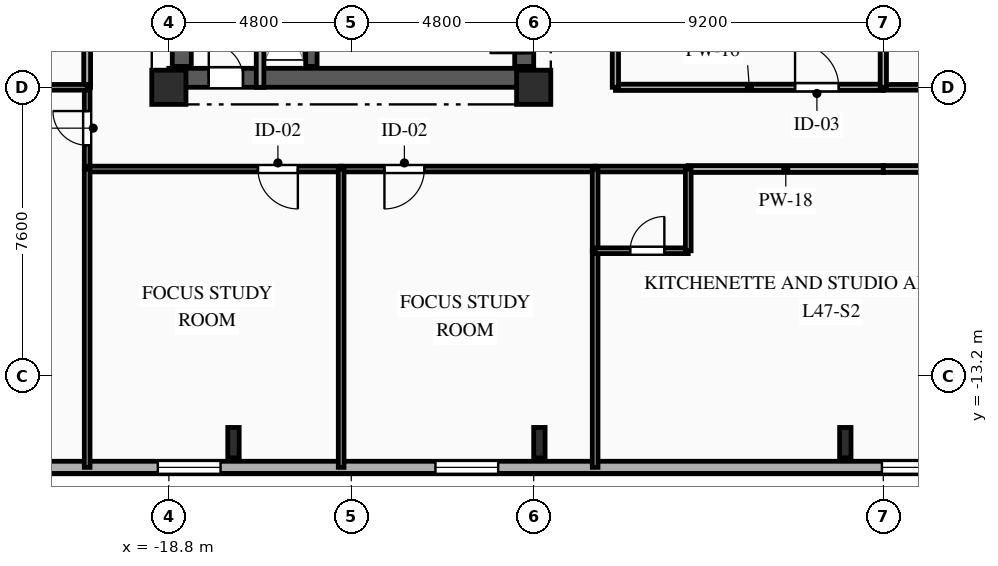
"""IFC4 building model, lengths in metres.
Left out: names, types, materials, properties, quantities, classifications, styles, units other than length and angle.
Written with IfcOpenShell. Run it as: python <this file> out.ifc"""

import sys

from ifc_helpers import new_model, si_unit, direction, frame, frame_2d, origin, origin_2d, place, context, subcontext, project, spatial, rectangle, i_section, extrude, element, fill, save


model = new_model("IFC4")
c1 = context("Model", 3, precision=1e-05, world=origin(), true_north=direction((0.0, 1.0)))
c2 = subcontext(c1, "Body", "Model", "MODEL_VIEW")
j1 = project(units=[si_unit("LENGTHUNIT", "METRE"), si_unit("PLANEANGLEUNIT", "RADIAN")], contexts=[c1])
p1 = place(None, origin())
s1 = spatial("IfcSite", under=j1, at=p1, CompositionType="ELEMENT")
p2 = place(p1, origin())
s2 = spatial("IfcBuilding", under=s1, at=p2, CompositionType="ELEMENT")
p3 = place(p2, frame((0.0, 0.0, 167.85)))
s3 = spatial("IfcBuildingStorey", under=s2, at=p3, CompositionType="ELEMENT", Elevation=167.85)
for number, where, z_axis, x_axis in (
    (1, (-18.8, -5.6, 0.0), (0.0, 0.0, 1.0), (1.0, 0.0, 0.0)),
    (2, (-9.2, -5.6, 0.0), (0.0, 0.0, 1.0), (1.0, 0.0, 0.0)),
):
    element("IfcColumn", number, at=place(p3, frame(where, z_axis=z_axis, x_axis=x_axis)), inside=s3, PredefinedType="COLUMN", context=c2, shape_type="SweptSolid", body=[
        extrude(rectangle(XDim=0.9, YDim=0.9, at=origin_2d()), origin(), (0.0, 0.0, 1.0), 3.35),
    ])
for number, where, z_axis, x_axis in (
    (3, (-17.1, -14.95, 0.0), (0.0, 0.0, 1.0), (1.0, 0.0, 0.0)),
    (4, (-9.05, -14.95, 0.0), (0.0, 0.0, 1.0), (1.0, 0.0, 0.0)),
    (5, (-1.0, -14.95, 0.0), (0.0, 0.0, 1.0), (1.0, 0.0, 0.0)),
):
    element("IfcColumn", number, at=place(p3, frame(where, z_axis=z_axis, x_axis=x_axis)), inside=s3, PredefinedType="COLUMN", context=c2, shape_type="SweptSolid", body=[
        extrude(i_section(OverallWidth=0.3, OverallDepth=0.8, WebThickness=0.018, FlangeThickness=0.033, FilletRadius=0.03, at=origin_2d()), origin(), (0.0, 0.0, 1.0), 3.35),
    ])
p4 = place(p3, frame((23.8, -15.6, 0.0), z_axis=(0.0, 0.0, 1.0), x_axis=(-1.0, 0.0, 0.0)))
e6 = element("IfcWall", 6, at=p4, inside=s3, PredefinedType="SOLIDWALL", context=c2, shape_type="SweptSolid", body=[
    extrude(rectangle(XDim=49.6, YDim=0.32, at=frame_2d((24.8, 0.0))), origin(), (0.0, 0.0, 1.0), 3.04),
])
p5 = place(p4, frame((1.13, 0.0, 0.85)))
e7 = element("IfcOpeningElement", 7, at=p5, cuts=e6, PredefinedType="OPENING", context=c2, shape_type="SweptSolid", body=[
    extrude(rectangle(XDim=1.1, YDim=1.85, at=frame_2d((0.55, 0.925))), frame((0.0, 0.17, 0.0), z_axis=(0.0, -1.0, 0.0), x_axis=(1.0, 0.0, 0.0)), (0.0, 0.0, 1.0), 0.34),
])
p6 = place(p4, frame((5.695, 0.0, 0.85)))
e8 = element("IfcOpeningElement", 8, at=p6, cuts=e6, PredefinedType="OPENING", context=c2, shape_type="SweptSolid", body=[
    extrude(rectangle(XDim=1.65, YDim=1.85, at=frame_2d((0.825, 0.925))), frame((0.0, 0.17, 0.0), z_axis=(0.0, -1.0, 0.0), x_axis=(1.0, 0.0, 0.0)), (0.0, 0.0, 1.0), 0.34),
])
p7 = place(p4, frame((12.975, 0.0, 0.85)))
e9 = element("IfcOpeningElement", 9, at=p7, cuts=e6, PredefinedType="OPENING", context=c2, shape_type="SweptSolid", body=[
    extrude(rectangle(XDim=1.65, YDim=1.85, at=frame_2d((0.825, 0.925))), frame((0.0, 0.17, 0.0), z_axis=(0.0, -1.0, 0.0), x_axis=(1.0, 0.0, 0.0)), (0.0, 0.0, 1.0), 0.34),
])
p8 = place(p4, frame((21.636, 0.0, 0.85)))
e10 = element("IfcOpeningElement", 10, at=p8, cuts=e6, PredefinedType="OPENING", context=c2, shape_type="SweptSolid", body=[
    extrude(rectangle(XDim=2.2, YDim=1.85, at=frame_2d((1.1, 0.925))), frame((0.0, 0.17, 0.0), z_axis=(0.0, -1.0, 0.0), x_axis=(1.0, 0.0, 0.0)), (0.0, 0.0, 1.0), 0.34),
])
p9 = place(p4, frame((33.935, 0.0, 0.85)))
e11 = element("IfcOpeningElement", 11, at=p9, cuts=e6, PredefinedType="OPENING", context=c2, shape_type="SweptSolid", body=[
    extrude(rectangle(XDim=1.65, YDim=1.85, at=frame_2d((0.825, 0.925))), frame((0.0, 0.17, 0.0), z_axis=(0.0, -1.0, 0.0), x_axis=(1.0, 0.0, 0.0)), (0.0, 0.0, 1.0), 0.34),
])
p10 = place(p4, frame((41.24, 0.0, 0.85)))
e12 = element("IfcOpeningElement", 12, at=p10, cuts=e6, PredefinedType="OPENING", context=c2, shape_type="SweptSolid", body=[
    extrude(rectangle(XDim=1.65, YDim=1.85, at=frame_2d((0.825, 0.925))), frame((0.0, 0.17, 0.0), z_axis=(0.0, -1.0, 0.0), x_axis=(1.0, 0.0, 0.0)), (0.0, 0.0, 1.0), 0.34),
])
p11 = place(p4, frame((46.175, 0.0, 0.85)))
e13 = element("IfcOpeningElement", 13, at=p11, cuts=e6, PredefinedType="OPENING", context=c2, shape_type="SweptSolid", body=[
    extrude(rectangle(XDim=1.65, YDim=1.85, at=frame_2d((0.825, 0.925))), frame((0.0, 0.17, 0.0), z_axis=(0.0, -1.0, 0.0), x_axis=(1.0, 0.0, 0.0)), (0.0, 0.0, 1.0), 0.34),
])
p12 = place(p3, frame((-18.8, -5.35, 0.0), z_axis=(0.0, 0.0, 1.0), x_axis=(1.0, 0.0, 0.0)))
e14 = element("IfcWall", 14, at=p12, inside=s3, PredefinedType="SHEAR", context=c2, shape_type="SweptSolid", body=[
    extrude(rectangle(XDim=9.6, YDim=0.5, at=frame_2d((4.8, 0.0))), origin(), (0.0, 0.0, 1.0), 3.04),
])
p13 = place(p12, frame((1.05, 0.0, 0.0)))
e15 = element("IfcOpeningElement", 15, at=p13, cuts=e14, PredefinedType="OPENING", context=c2, shape_type="SweptSolid", body=[
    extrude(rectangle(XDim=0.9, YDim=2.1, at=frame_2d((0.45, 1.05))), frame((0.0, 0.26, 0.0), z_axis=(0.0, -1.0, 0.0), x_axis=(1.0, 0.0, 0.0)), (0.0, 0.0, 1.0), 0.52),
])
p14 = place(p3, frame((-18.46, -5.05, 0.0), z_axis=(0.0, 0.0, 1.0), x_axis=(0.0, 1.0, 0.0)))
e16 = element("IfcWall", 16, at=p14, inside=s3, PredefinedType="SHEAR", context=c2, shape_type="SweptSolid", body=[
    extrude(rectangle(XDim=10.1, YDim=0.5, at=frame_2d((5.05, 0.0))), origin(), (0.0, 0.0, 1.0), 3.04),
])
p15 = place(p3, frame((-9.45, -5.05, 0.0), z_axis=(0.0, 0.0, 1.0), x_axis=(0.0, 1.0, 0.0)))
e17 = element("IfcWall", 17, at=p15, inside=s3, PredefinedType="SHEAR", context=c2, shape_type="SweptSolid", body=[
    extrude(rectangle(XDim=10.1, YDim=0.5, at=frame_2d((5.05, 0.0))), origin(), (0.0, 0.0, 1.0), 3.04),
])
p16 = place(p15, frame((7.175, 0.0, 0.0)))
e18 = element("IfcOpeningElement", 18, at=p16, cuts=e17, PredefinedType="OPENING", context=c2, shape_type="SweptSolid", body=[
    extrude(rectangle(XDim=0.9, YDim=2.1, at=frame_2d((0.45, 1.05))), frame((0.0, 0.26, 0.0), z_axis=(0.0, -1.0, 0.0), x_axis=(1.0, 0.0, 0.0)), (0.0, 0.0, 1.0), 0.52),
])
p17 = place(p15, frame((2.4, 0.0, 0.0)))
e19 = element("IfcOpeningElement", 19, at=p17, cuts=e17, PredefinedType="OPENING", context=c2, shape_type="SweptSolid", body=[
    extrude(rectangle(XDim=1.2, YDim=2.15, at=frame_2d((0.6, 1.075))), frame((0.0, 0.26, 0.0), z_axis=(0.0, -1.0, 0.0), x_axis=(1.0, 0.0, 0.0)), (0.0, 0.0, 1.0), 0.52),
])
p18 = place(p15, frame((0.35, 0.0, 0.0)))
e20 = element("IfcOpeningElement", 20, at=p18, cuts=e17, PredefinedType="OPENING", context=c2, shape_type="SweptSolid", body=[
    extrude(rectangle(XDim=0.9, YDim=2.1, at=frame_2d((0.45, 1.05))), frame((0.0, 0.26, 0.0), z_axis=(0.0, -1.0, 0.0), x_axis=(1.0, 0.0, 0.0)), (0.0, 0.0, 1.0), 0.52),
])
p19 = place(p15, frame((5.0, 0.0, 0.0)))
e21 = element("IfcOpeningElement", 21, at=p19, cuts=e17, PredefinedType="OPENING", context=c2, shape_type="SweptSolid", body=[
    extrude(rectangle(XDim=0.9, YDim=2.1, at=frame_2d((0.45, 1.05))), frame((0.0, 0.26, 0.0), z_axis=(0.0, -1.0, 0.0), x_axis=(1.0, 0.0, 0.0)), (0.0, 0.0, 1.0), 0.52),
])
p20 = place(p3, frame((-15.05, -5.05, 0.0), z_axis=(0.0, 0.0, 1.0), x_axis=(0.0, 1.0, 0.0)))
e22 = element("IfcWall", 22, at=p20, inside=s3, PredefinedType="SHEAR", context=c2, shape_type="SweptSolid", body=[
    extrude(rectangle(XDim=10.1, YDim=0.3, at=frame_2d((5.05, 0.0))), origin(), (0.0, 0.0, 1.0), 3.04),
])
p21 = place(p3, frame((-16.4, -5.6, 0.0), z_axis=(0.0, 0.0, 1.0), x_axis=(0.0, 1.0, 0.0)))
e23 = element("IfcWall", 23, at=p21, inside=s3, PredefinedType="PARTITIONING", context=c2, shape_type="SweptSolid", body=[
    extrude(rectangle(XDim=3.49, YDim=0.2, at=frame_2d((1.745, 0.0))), origin(), (0.0, 0.0, 1.0), 3.04),
])
p22 = place(p3, frame((-20.95, -7.75, 0.0), z_axis=(0.0, 0.0, 1.0), x_axis=(0.0, 1.0, 0.0)))
e24 = element("IfcWall", 24, at=p22, inside=s3, PredefinedType="PARTITIONING", context=c2, shape_type="SweptSolid", body=[
    extrude(rectangle(XDim=2.15, YDim=0.15, at=frame_2d((1.075, 0.0))), origin(), (0.0, 0.0, 1.0), 3.04),
])
p23 = place(p22, frame((0.625, 0.0, 0.0)))
e25 = element("IfcOpeningElement", 25, at=p23, cuts=e24, PredefinedType="OPENING", context=c2, shape_type="SweptSolid", body=[
    extrude(rectangle(XDim=0.9, YDim=2.1, at=frame_2d((0.45, 1.05))), frame((0.0, 0.085, 0.0), z_axis=(0.0, -1.0, 0.0), x_axis=(1.0, 0.0, 0.0)), (0.0, 0.0, 1.0), 0.17),
])
p24 = place(p3, frame((-14.267, -7.75, 0.0), z_axis=(0.0, 0.0, 1.0), x_axis=(-1.0, 0.0, 0.0)))
e26 = element("IfcWall", 26, at=p24, inside=s3, PredefinedType="PARTITIONING", context=c2, shape_type="SweptSolid", body=[
    extrude(rectangle(XDim=6.683, YDim=0.15, at=frame_2d((3.342, 0.0))), origin(), (0.0, 0.0, 1.0), 3.04),
])
p25 = place(p24, frame((1.139, 0.0, 0.0)))
e27 = element("IfcOpeningElement", 27, at=p25, cuts=e26, PredefinedType="OPENING", context=c2, shape_type="SweptSolid", body=[
    extrude(rectangle(XDim=1.05, YDim=2.15, at=frame_2d((0.525, 1.075))), frame((0.0, 0.085, 0.0), z_axis=(0.0, -1.0, 0.0), x_axis=(1.0, 0.0, 0.0)), (0.0, 0.0, 1.0), 0.17),
])
p26 = place(p3, frame((-7.583, -7.75, 0.0), z_axis=(0.0, 0.0, 1.0), x_axis=(-1.0, 0.0, 0.0)))
e28 = element("IfcWall", 28, at=p26, inside=s3, PredefinedType="PARTITIONING", context=c2, shape_type="SweptSolid", body=[
    extrude(rectangle(XDim=6.684, YDim=0.15, at=frame_2d((3.342, 0.0))), origin(), (0.0, 0.0, 1.0), 3.04),
])
p27 = place(p26, frame((4.494, 0.0, 0.0)))
e29 = element("IfcOpeningElement", 29, at=p27, cuts=e28, PredefinedType="OPENING", context=c2, shape_type="SweptSolid", body=[
    extrude(rectangle(XDim=1.05, YDim=2.15, at=frame_2d((0.525, 1.075))), frame((0.0, 0.085, 0.0), z_axis=(0.0, -1.0, 0.0), x_axis=(1.0, 0.0, 0.0)), (0.0, 0.0, 1.0), 0.17),
])
p28 = place(p3, frame((0.0, -7.75, 0.0), z_axis=(0.0, 0.0, 1.0), x_axis=(-1.0, 0.0, 0.0)))
e30 = element("IfcWall", 30, at=p28, inside=s3, PredefinedType="PARTITIONING", context=c2, shape_type="SweptSolid", body=[
    extrude(rectangle(XDim=5.133, YDim=0.18, at=frame_2d((2.566, 0.0))), origin(), (0.0, 0.0, 1.0), 3.04),
])
p29 = place(p3, frame((-5.133, -7.75, 0.0), z_axis=(0.0, 0.0, 1.0), x_axis=(-1.0, 0.0, 0.0)))
e31 = element("IfcWall", 31, at=p29, inside=s3, PredefinedType="PLUMBINGWALL", context=c2, shape_type="SweptSolid", body=[
    extrude(rectangle(XDim=2.45, YDim=0.15, at=frame_2d((1.225, 0.0))), origin(), (0.0, 0.0, 1.0), 3.04),
])
p30 = place(p3, frame((-7.05, -5.6, 0.0), z_axis=(0.0, 0.0, 1.0), x_axis=(1.0, 0.0, 0.0)))
e32 = element("IfcWall", 32, at=p30, inside=s3, PredefinedType="PARTITIONING", context=c2, shape_type="SweptSolid", body=[
    extrude(rectangle(XDim=7.05, YDim=0.165, at=frame_2d((3.525, 0.0))), origin(), (0.0, 0.0, 1.0), 2.525),
])
p31 = place(p30, frame((4.728, 0.0, 0.0)))
e33 = element("IfcOpeningElement", 33, at=p31, cuts=e32, PredefinedType="OPENING", context=c2, shape_type="SweptSolid", body=[
    extrude(rectangle(XDim=1.15, YDim=2.15, at=frame_2d((0.575, 1.075))), frame((0.0, 0.093, 0.0), z_axis=(0.0, -1.0, 0.0), x_axis=(1.0, 0.0, 0.0)), (0.0, 0.0, 1.0), 0.185),
])
p32 = place(p3, frame((6.383, -7.75, 0.0), z_axis=(0.0, 0.0, 1.0), x_axis=(-1.0, 0.0, 0.0)))
e34 = element("IfcWall", 34, at=p32, inside=s3, PredefinedType="PARTITIONING", context=c2, shape_type="SweptSolid", body=[
    extrude(rectangle(XDim=6.383, YDim=0.18, at=frame_2d((3.191, 0.0))), origin(), (0.0, 0.0, 1.0), 3.04),
])
p33 = place(p32, frame((4.275, 0.0, 0.0)))
e35 = element("IfcOpeningElement", 35, at=p33, cuts=e34, PredefinedType="OPENING", context=c2, shape_type="SweptSolid", body=[
    extrude(rectangle(XDim=1.0, YDim=2.15, at=frame_2d((0.5, 1.075))), frame((0.0, 0.1, 0.0), z_axis=(0.0, -1.0, 0.0), x_axis=(1.0, 0.0, 0.0)), (0.0, 0.0, 1.0), 0.2),
])
p34 = place(p3, frame((0.0, -5.6, 0.0), z_axis=(0.0, 0.0, 1.0), x_axis=(1.0, 0.0, 0.0)))
e36 = element("IfcWall", 36, at=p34, inside=s3, PredefinedType="PARTITIONING", context=c2, shape_type="SweptSolid", body=[
    extrude(rectangle(XDim=7.05, YDim=0.15, at=frame_2d((3.525, 0.0))), origin(), (0.0, 0.0, 1.0), 2.525),
])
p35 = place(p34, frame((1.185, 0.0, 0.0)))
e37 = element("IfcOpeningElement", 37, at=p35, cuts=e36, PredefinedType="OPENING", context=c2, shape_type="SweptSolid", body=[
    extrude(rectangle(XDim=1.05, YDim=2.15, at=frame_2d((0.525, 1.075))), frame((0.0, 0.085, 0.0), z_axis=(0.0, -1.0, 0.0), x_axis=(1.0, 0.0, 0.0)), (0.0, 0.0, 1.0), 0.17),
])
p36 = place(p3, frame((-20.95, -5.6, 0.0), z_axis=(0.0, 0.0, 1.0), x_axis=(0.0, 1.0, 0.0)))
e38 = element("IfcWall", 38, at=p36, inside=s3, PredefinedType="PARTITIONING", context=c2, shape_type="SweptSolid", body=[
    extrude(rectangle(XDim=14.1, YDim=0.18, at=frame_2d((7.05, 0.0))), origin(), (0.0, 0.0, 1.0), 3.04),
])
p37 = place(p36, frame((5.058, 0.0, 0.0)))
e39 = element("IfcOpeningElement", 39, at=p37, cuts=e38, PredefinedType="OPENING", context=c2, shape_type="SweptSolid", body=[
    extrude(rectangle(XDim=1.0, YDim=2.15, at=frame_2d((0.5, 1.075))), frame((0.0, 0.1, 0.0), z_axis=(0.0, -1.0, 0.0), x_axis=(1.0, 0.0, 0.0)), (0.0, 0.0, 1.0), 0.2),
])
p38 = place(p3, frame((-7.05, -2.95, 0.0), z_axis=(0.0, 0.0, 1.0), x_axis=(0.0, -1.0, 0.0)))
e40 = element("IfcWall", 40, at=p38, inside=s3, PredefinedType="PARTITIONING", context=c2, shape_type="SweptSolid", body=[
    extrude(rectangle(XDim=2.65, YDim=0.165, at=frame_2d((1.325, 0.0))), origin(), (0.0, 0.0, 1.0), 3.04),
])
p39 = place(p3, frame((-20.95, -5.6, 0.0), z_axis=(0.0, 0.0, 1.0), x_axis=(-1.0, 0.0, 0.0)))
e41 = element("IfcWall", 41, at=p39, inside=s3, PredefinedType="PARTITIONING", context=c2, shape_type="SweptSolid", body=[
    extrude(rectangle(XDim=2.65, YDim=0.15, at=frame_2d((1.325, 0.0))), origin(), (0.0, 0.0, 1.0), 3.04),
])
p40 = place(p39, frame((0.965, 0.0, 0.0)))
e42 = element("IfcOpeningElement", 42, at=p40, cuts=e41, PredefinedType="OPENING", context=c2, shape_type="SweptSolid", body=[
    extrude(rectangle(XDim=1.05, YDim=2.15, at=frame_2d((0.525, 1.075))), frame((0.0, 0.085, 0.0), z_axis=(0.0, -1.0, 0.0), x_axis=(1.0, 0.0, 0.0)), (0.0, 0.0, 1.0), 0.17),
])
for number, where, z_axis, x_axis in (
    (43, (-20.95, -7.75, 0.0), (0.0, 0.0, 1.0), (0.0, -1.0, 0.0)),
    (44, (-14.267, -7.75, 0.0), (0.0, 0.0, 1.0), (0.0, -1.0, 0.0)),
):
    element("IfcWall", number, at=place(p3, frame(where, z_axis=z_axis, x_axis=x_axis)), inside=s3, PredefinedType="PARTITIONING", context=c2, shape_type="SweptSolid", body=[
        extrude(rectangle(XDim=7.85, YDim=0.15, at=frame_2d((3.925, 0.0))), origin(), (0.0, 0.0, 1.0), 3.04),
    ])
p41 = place(p3, frame((-7.583, -9.9, 0.0), z_axis=(0.0, 0.0, 1.0), x_axis=(0.0, -1.0, 0.0)))
e45 = element("IfcWall", 45, at=p41, inside=s3, PredefinedType="PARTITIONING", context=c2, shape_type="SweptSolid", body=[
    extrude(rectangle(XDim=5.7, YDim=0.15, at=frame_2d((2.85, 0.0))), origin(), (0.0, 0.0, 1.0), 3.04),
])
p42 = place(p3, frame((-7.583, -7.75, 0.0), z_axis=(0.0, 0.0, 1.0), x_axis=(0.0, -1.0, 0.0)))
e46 = element("IfcWall", 46, at=p42, inside=s3, PredefinedType="PLUMBINGWALL", context=c2, shape_type="SweptSolid", body=[
    extrude(rectangle(XDim=2.15, YDim=0.15, at=frame_2d((1.075, 0.0))), origin(), (0.0, 0.0, 1.0), 3.04),
])
p43 = place(p3, frame((-7.583, -9.9, 0.0), z_axis=(0.0, 0.0, 1.0), x_axis=(1.0, 0.0, 0.0)))
e47 = element("IfcWall", 47, at=p43, inside=s3, PredefinedType="PLUMBINGWALL", context=c2, shape_type="SweptSolid", body=[
    extrude(rectangle(XDim=2.45, YDim=0.15, at=frame_2d((1.225, 0.0))), origin(), (0.0, 0.0, 1.0), 3.04),
])
p44 = place(p43, frame((0.921, 0.0, 0.0)))
e48 = element("IfcOpeningElement", 48, at=p44, cuts=e47, PredefinedType="OPENING", context=c2, shape_type="SweptSolid", body=[
    extrude(rectangle(XDim=0.9, YDim=2.1, at=frame_2d((0.45, 1.05))), frame((0.0, 0.085, 0.0), z_axis=(0.0, -1.0, 0.0), x_axis=(1.0, 0.0, 0.0)), (0.0, 0.0, 1.0), 0.17),
])
p45 = place(p3, frame((-5.133, -9.9, 0.0), z_axis=(0.0, 0.0, 1.0), x_axis=(0.0, 1.0, 0.0)))
e49 = element("IfcWall", 49, at=p45, inside=s3, PredefinedType="PLUMBINGWALL", context=c2, shape_type="SweptSolid", body=[
    extrude(rectangle(XDim=2.15, YDim=0.15, at=frame_2d((1.075, 0.0))), origin(), (0.0, 0.0, 1.0), 3.04),
])
p46 = place(p3, frame((0.0, -2.95, 0.0), z_axis=(0.0, 0.0, 1.0), x_axis=(0.0, -1.0, 0.0)))
e50 = element("IfcWall", 50, at=p46, inside=s3, PredefinedType="PARTITIONING", context=c2, shape_type="SweptSolid", body=[
    extrude(rectangle(XDim=2.65, YDim=0.165, at=frame_2d((1.325, 0.0))), origin(), (0.0, 0.0, 1.0), 3.04),
])
p47 = place(p8, origin())
e51 = element("IfcWindow", 51, at=p47, inside=s3, PartitioningType="SINGLE_PANEL", PredefinedType="WINDOW", context=c2, shape_type="SweptSolid", body=[
    extrude(rectangle(XDim=2.2, YDim=1.85, at=frame_2d((1.1, 0.925))), frame((0.0, 0.03, 0.0), z_axis=(0.0, -1.0, 0.0), x_axis=(1.0, 0.0, 0.0)), (0.0, 0.0, 1.0), 0.06),
])
fill(e10, e51)
p48 = place(p9, origin())
e52 = element("IfcWindow", 52, at=p48, inside=s3, PartitioningType="SINGLE_PANEL", PredefinedType="WINDOW", context=c2, shape_type="SweptSolid", body=[
    extrude(rectangle(XDim=1.65, YDim=1.85, at=frame_2d((0.825, 0.925))), frame((0.0, 0.03, 0.0), z_axis=(0.0, -1.0, 0.0), x_axis=(1.0, 0.0, 0.0)), (0.0, 0.0, 1.0), 0.06),
])
fill(e11, e52)
p49 = place(p10, origin())
e53 = element("IfcWindow", 53, at=p49, inside=s3, PartitioningType="SINGLE_PANEL", PredefinedType="WINDOW", context=c2, shape_type="SweptSolid", body=[
    extrude(rectangle(XDim=1.65, YDim=1.85, at=frame_2d((0.825, 0.925))), frame((0.0, 0.03, 0.0), z_axis=(0.0, -1.0, 0.0), x_axis=(1.0, 0.0, 0.0)), (0.0, 0.0, 1.0), 0.06),
])
fill(e12, e53)
p50 = place(p13, origin())
e54 = element("IfcDoor", 54, at=p50, inside=s3, OperationType="SINGLE_SWING_LEFT", PredefinedType="DOOR", context=c2, shape_type="SweptSolid", body=[
    extrude(rectangle(XDim=0.9, YDim=2.1, at=frame_2d((0.45, 1.05))), frame((0.0, 0.025, 0.0), z_axis=(0.0, -1.0, 0.0), x_axis=(1.0, 0.0, 0.0)), (0.0, 0.0, 1.0), 0.05),
])
fill(e15, e54)
p51 = place(p18, origin())
e55 = element("IfcDoor", 55, at=p51, inside=s3, OperationType="SINGLE_SWING_LEFT", PredefinedType="DOOR", context=c2, shape_type="SweptSolid", body=[
    extrude(rectangle(XDim=0.9, YDim=2.1, at=frame_2d((0.45, 1.05))), frame((0.0, 0.025, 0.0), z_axis=(0.0, -1.0, 0.0), x_axis=(1.0, 0.0, 0.0)), (0.0, 0.0, 1.0), 0.05),
])
fill(e20, e55)
p52 = place(p23, origin())
e56 = element("IfcDoor", 56, at=p52, inside=s3, OperationType="SINGLE_SWING_RIGHT", PredefinedType="DOOR", context=c2, shape_type="SweptSolid", body=[
    extrude(rectangle(XDim=0.9, YDim=2.1, at=frame_2d((0.45, 1.05))), frame((0.0, 0.025, 0.0), z_axis=(0.0, -1.0, 0.0), x_axis=(1.0, 0.0, 0.0)), (0.0, 0.0, 1.0), 0.05),
])
fill(e25, e56)
p53 = place(p25, origin())
e57 = element("IfcDoor", 57, at=p53, inside=s3, OperationType="SINGLE_SWING_LEFT", PredefinedType="DOOR", context=c2, shape_type="SweptSolid", body=[
    extrude(rectangle(XDim=1.05, YDim=2.15, at=frame_2d((0.525, 1.075))), frame((0.0, 0.025, 0.0), z_axis=(0.0, -1.0, 0.0), x_axis=(1.0, 0.0, 0.0)), (0.0, 0.0, 1.0), 0.05),
])
fill(e27, e57)
p54 = place(p27, origin())
e58 = element("IfcDoor", 58, at=p54, inside=s3, OperationType="SINGLE_SWING_RIGHT", PredefinedType="DOOR", context=c2, shape_type="SweptSolid", body=[
    extrude(rectangle(XDim=1.05, YDim=2.15, at=frame_2d((0.525, 1.075))), frame((0.0, 0.025, 0.0), z_axis=(0.0, -1.0, 0.0), x_axis=(1.0, 0.0, 0.0)), (0.0, 0.0, 1.0), 0.05),
])
fill(e29, e58)
p55 = place(p31, origin())
e59 = element("IfcDoor", 59, at=p55, inside=s3, OperationType="SINGLE_SWING_LEFT", PredefinedType="DOOR", context=c2, shape_type="SweptSolid", body=[
    extrude(rectangle(XDim=1.15, YDim=2.15, at=frame_2d((0.575, 1.075))), frame((0.0, 0.025, 0.0), z_axis=(0.0, -1.0, 0.0), x_axis=(1.0, 0.0, 0.0)), (0.0, 0.0, 1.0), 0.05),
])
fill(e33, e59)
p56 = place(p44, origin())
e60 = element("IfcDoor", 60, at=p56, inside=s3, OperationType="SINGLE_SWING_RIGHT", PredefinedType="DOOR", context=c2, shape_type="SweptSolid", body=[
    extrude(rectangle(XDim=0.9, YDim=2.1, at=frame_2d((0.45, 1.05))), frame((0.0, 0.025, 0.0), z_axis=(0.0, -1.0, 0.0), x_axis=(1.0, 0.0, 0.0)), (0.0, 0.0, 1.0), 0.05),
])
fill(e48, e60)
save(model, sys.argv[1])
